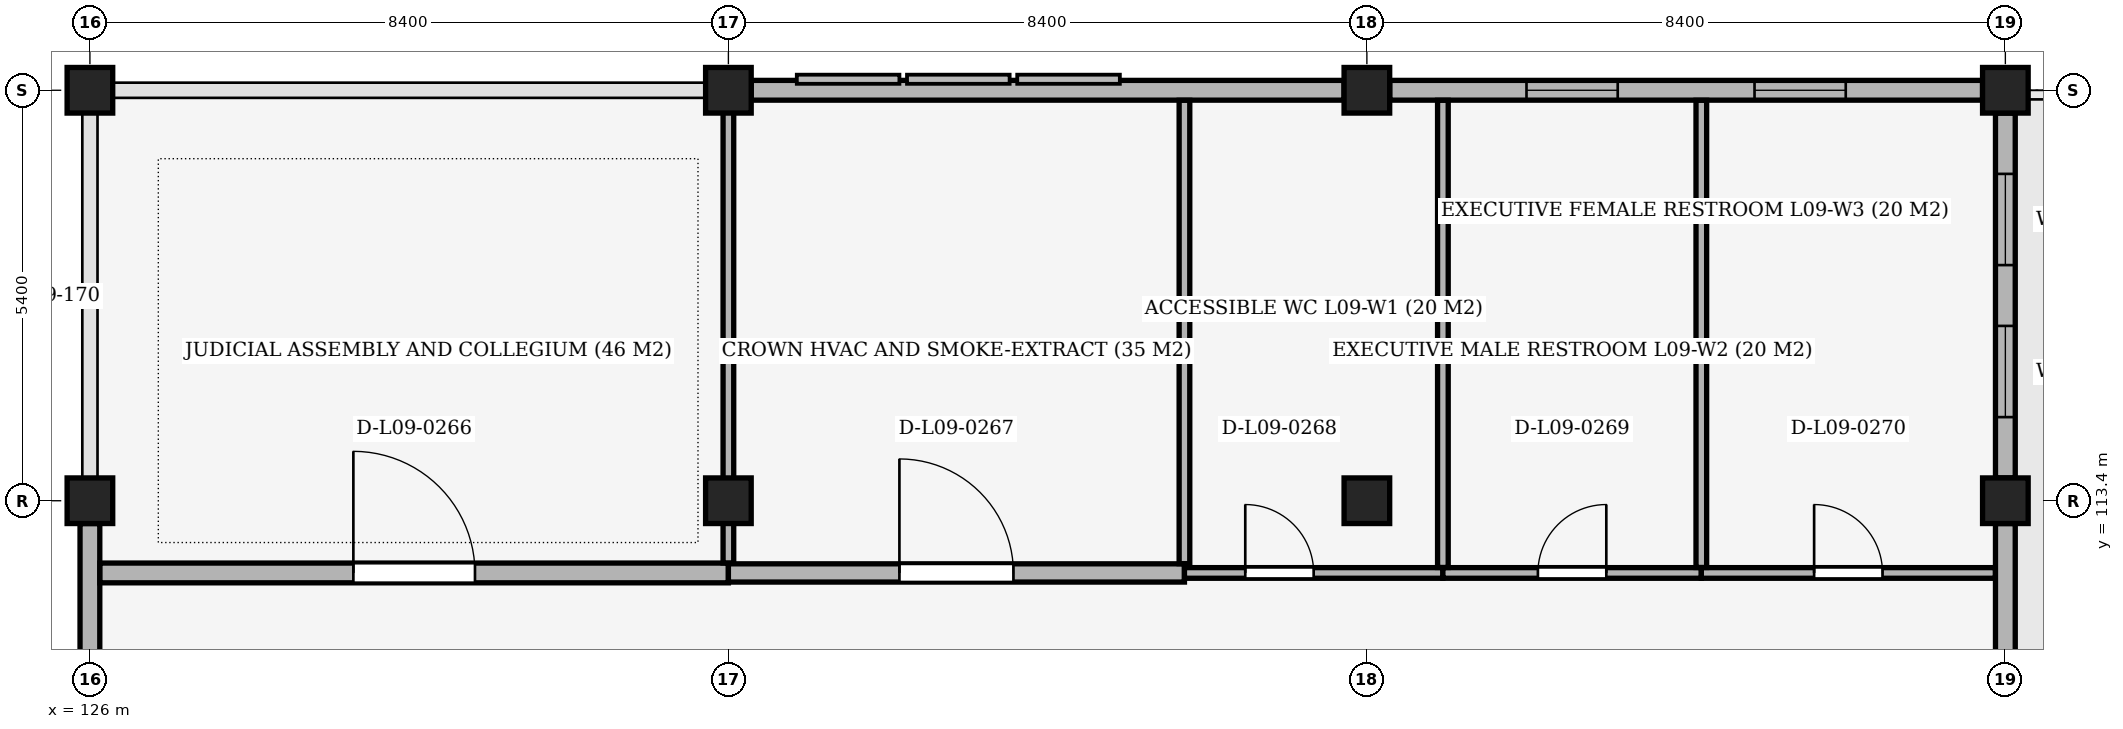
"""IFC4 building model, lengths in metres.
Left out: names, types, materials, properties, quantities, classifications, styles, units other than length and angle.
Written with IfcOpenShell. Run it as: python <this file> out.ifc"""

import sys

from ifc_helpers import new_model, si_unit, direction, frame, frame_2d, origin, origin_2d, place, context, subcontext, project, spatial, rectangle, extrude, element, fill, save


model = new_model("IFC4")
c1 = context("Model", 3, precision=1e-05, world=origin(), true_north=direction((0.0, 1.0)))
c2 = subcontext(c1, "Body", "Model", "MODEL_VIEW")
j1 = project(units=[si_unit("LENGTHUNIT", "METRE"), si_unit("PLANEANGLEUNIT", "RADIAN")], contexts=[c1])
p1 = place(None, origin())
s1 = spatial("IfcSite", under=j1, at=p1, CompositionType="ELEMENT")
p2 = place(p1, origin())
s2 = spatial("IfcBuilding", under=s1, at=p2, CompositionType="ELEMENT")
p3 = place(p2, frame((0.0, 0.0, 42.0)))
s3 = spatial("IfcBuildingStorey", under=s2, at=p3, CompositionType="ELEMENT", Elevation=42.0)
for number, where, z_axis, x_axis in (
    (1, (126.0, 113.4, 0.0), (0.0, 0.0, 1.0), (1.0, 0.0, 0.0)),
    (2, (126.0, 118.8, 0.0), (0.0, 0.0, 1.0), (1.0, 0.0, 0.0)),
    (3, (134.4, 113.4, 0.0), (0.0, 0.0, 1.0), (1.0, 0.0, 0.0)),
    (4, (134.4, 118.8, 0.0), (0.0, 0.0, 1.0), (1.0, 0.0, 0.0)),
    (5, (142.8, 113.4, 0.0), (0.0, 0.0, 1.0), (1.0, 0.0, 0.0)),
    (6, (142.8, 118.8, 0.0), (0.0, 0.0, 1.0), (1.0, 0.0, 0.0)),
    (7, (151.2, 113.4, 0.0), (0.0, 0.0, 1.0), (1.0, 0.0, 0.0)),
    (8, (151.2, 118.8, 0.0), (0.0, 0.0, 1.0), (1.0, 0.0, 0.0)),
):
    element("IfcColumn", number, at=place(p3, frame(where, z_axis=z_axis, x_axis=x_axis)), inside=s3, PredefinedType="COLUMN", context=c2, shape_type="SweptSolid", body=[
        extrude(rectangle(XDim=0.6, YDim=0.6, at=origin_2d()), origin(), (0.0, 0.0, 1.0), 3.9),
    ])
p4 = place(p3, frame((126.0, 108.3, 0.0), z_axis=(0.0, 0.0, 1.0), x_axis=(0.0, 1.0, 0.0)))
e9 = element("IfcWall", 9, at=p4, inside=s3, PredefinedType="SOLIDWALL", context=c2, shape_type="SweptSolid", body=[
    extrude(rectangle(XDim=4.8, YDim=0.26, at=frame_2d((2.4, 0.0))), origin(), (0.0, 0.0, 1.0), 3.11),
])
p5 = place(p4, frame((0.8, 0.0, 1.86)))
e10 = element("IfcOpeningElement", 10, at=p5, cuts=e9, PredefinedType="OPENING", context=c2, shape_type="SweptSolid", body=[
    extrude(rectangle(XDim=1.2, YDim=0.9, at=frame_2d((0.6, 0.45))), frame((0.0, 0.145, 0.0), z_axis=(0.0, -1.0, 0.0), x_axis=(1.0, 0.0, 0.0)), (0.0, 0.0, 1.0), 0.29),
])
p6 = place(p3, frame((134.7, 118.8, 0.0), z_axis=(0.0, 0.0, 1.0), x_axis=(1.0, 0.0, 0.0)))
e11 = element("IfcWall", 11, at=p6, inside=s3, PredefinedType="SOLIDWALL", context=c2, shape_type="SweptSolid", body=[
    extrude(rectangle(XDim=7.8, YDim=0.26, at=frame_2d((3.9, 0.0))), origin(), (0.0, 0.0, 1.0), 2.96),
])
p7 = place(p3, frame((143.1, 118.8, 0.0), z_axis=(0.0, 0.0, 1.0), x_axis=(1.0, 0.0, 0.0)))
e12 = element("IfcWall", 12, at=p7, inside=s3, PredefinedType="SOLIDWALL", context=c2, shape_type="SweptSolid", body=[
    extrude(rectangle(XDim=7.8, YDim=0.26, at=frame_2d((3.9, 0.0))), origin(), (0.0, 0.0, 1.0), 2.96),
])
p8 = place(p7, frame((1.8, 0.0, 1.71)))
e13 = element("IfcOpeningElement", 13, at=p8, cuts=e12, PredefinedType="OPENING", context=c2, shape_type="SweptSolid", body=[
    extrude(rectangle(XDim=1.2, YDim=0.9, at=frame_2d((0.6, 0.45))), frame((0.0, 0.145, 0.0), z_axis=(0.0, -1.0, 0.0), x_axis=(1.0, 0.0, 0.0)), (0.0, 0.0, 1.0), 0.29),
])
p9 = place(p7, frame((4.8, 0.0, 1.71)))
e14 = element("IfcOpeningElement", 14, at=p9, cuts=e12, PredefinedType="OPENING", context=c2, shape_type="SweptSolid", body=[
    extrude(rectangle(XDim=1.2, YDim=0.9, at=frame_2d((0.6, 0.45))), frame((0.0, 0.145, 0.0), z_axis=(0.0, -1.0, 0.0), x_axis=(1.0, 0.0, 0.0)), (0.0, 0.0, 1.0), 0.29),
])
p10 = place(p3, frame((151.2, 118.5, 0.0), z_axis=(0.0, 0.0, 1.0), x_axis=(0.0, -1.0, 0.0)))
e15 = element("IfcWall", 15, at=p10, inside=s3, PredefinedType="SOLIDWALL", context=c2, shape_type="SweptSolid", body=[
    extrude(rectangle(XDim=4.8, YDim=0.26, at=frame_2d((2.4, 0.0))), origin(), (0.0, 0.0, 1.0), 3.11),
])
p11 = place(p10, frame((0.8, 0.0, 1.86)))
e16 = element("IfcOpeningElement", 16, at=p11, cuts=e15, PredefinedType="OPENING", context=c2, shape_type="SweptSolid", body=[
    extrude(rectangle(XDim=1.2, YDim=0.9, at=frame_2d((0.6, 0.45))), frame((0.0, 0.145, 0.0), z_axis=(0.0, -1.0, 0.0), x_axis=(1.0, 0.0, 0.0)), (0.0, 0.0, 1.0), 0.29),
])
p12 = place(p10, frame((2.8, 0.0, 1.86)))
e17 = element("IfcOpeningElement", 17, at=p12, cuts=e15, PredefinedType="OPENING", context=c2, shape_type="SweptSolid", body=[
    extrude(rectangle(XDim=1.2, YDim=0.9, at=frame_2d((0.6, 0.45))), frame((0.0, 0.145, 0.0), z_axis=(0.0, -1.0, 0.0), x_axis=(1.0, 0.0, 0.0)), (0.0, 0.0, 1.0), 0.29),
])
p13 = place(p3, frame((151.2, 113.1, 0.0), z_axis=(0.0, 0.0, 1.0), x_axis=(0.0, -1.0, 0.0)))
e18 = element("IfcWall", 18, at=p13, inside=s3, PredefinedType="SOLIDWALL", context=c2, shape_type="SweptSolid", body=[
    extrude(rectangle(XDim=4.8, YDim=0.26, at=frame_2d((2.4, 0.0))), origin(), (0.0, 0.0, 1.0), 3.11),
])
p14 = place(p13, frame((2.8, 0.0, 1.86)))
e19 = element("IfcOpeningElement", 19, at=p14, cuts=e18, PredefinedType="OPENING", context=c2, shape_type="SweptSolid", body=[
    extrude(rectangle(XDim=1.2, YDim=0.9, at=frame_2d((0.6, 0.45))), frame((0.0, 0.145, 0.0), z_axis=(0.0, -1.0, 0.0), x_axis=(1.0, 0.0, 0.0)), (0.0, 0.0, 1.0), 0.29),
])
p15 = place(p3, frame((126.132, 112.45, 0.0), z_axis=(0.0, 0.0, 1.0), x_axis=(1.0, 0.0, 0.0)))
e20 = element("IfcWall", 20, at=p15, inside=s3, PredefinedType="PARTITIONING", context=c2, shape_type="SweptSolid", body=[
    extrude(rectangle(XDim=8.268, YDim=0.26, at=frame_2d((4.134, 0.0))), origin(), (0.0, 0.0, 1.0), 3.11),
])
p16 = place(p15, frame((3.334, 0.0, 0.0)))
e21 = element("IfcOpeningElement", 21, at=p16, cuts=e20, PredefinedType="OPENING", context=c2, shape_type="SweptSolid", body=[
    extrude(rectangle(XDim=1.6, YDim=2.3, at=frame_2d((0.8, 1.15))), frame((0.0, 0.145, 0.0), z_axis=(0.0, -1.0, 0.0), x_axis=(1.0, 0.0, 0.0)), (0.0, 0.0, 1.0), 0.29),
])
p17 = place(p3, frame((134.4, 112.45, 0.0), z_axis=(0.0, 0.0, 1.0), x_axis=(1.0, 0.0, 0.0)))
e22 = element("IfcWall", 22, at=p17, inside=s3, PredefinedType="PARTITIONING", context=c2, shape_type="SweptSolid", body=[
    extrude(rectangle(XDim=6.0, YDim=0.24, at=frame_2d((3.0, 0.0))), origin(), (0.0, 0.0, 1.0), 3.11),
])
p18 = place(p17, frame((2.25, 0.0, 0.0)))
e23 = element("IfcOpeningElement", 23, at=p18, cuts=e22, PredefinedType="OPENING", context=c2, shape_type="SweptSolid", body=[
    extrude(rectangle(XDim=1.5, YDim=2.2, at=frame_2d((0.75, 1.1))), frame((0.0, 0.135, 0.0), z_axis=(0.0, -1.0, 0.0), x_axis=(1.0, 0.0, 0.0)), (0.0, 0.0, 1.0), 0.27),
])
p19 = place(p3, frame((140.4, 112.45, 0.0), z_axis=(0.0, 0.0, 1.0), x_axis=(1.0, 0.0, 0.0)))
e24 = element("IfcWall", 24, at=p19, inside=s3, PredefinedType="PARTITIONING", context=c2, shape_type="SweptSolid", body=[
    extrude(rectangle(XDim=3.4, YDim=0.14, at=frame_2d((1.7, 0.0))), origin(), (0.0, 0.0, 1.0), 3.11),
])
p20 = place(p19, frame((0.8, 0.0, 0.0)))
e25 = element("IfcOpeningElement", 25, at=p20, cuts=e24, PredefinedType="OPENING", context=c2, shape_type="SweptSolid", body=[
    extrude(rectangle(XDim=0.9, YDim=2.1, at=frame_2d((0.45, 1.05))), frame((0.0, 0.085, 0.0), z_axis=(0.0, -1.0, 0.0), x_axis=(1.0, 0.0, 0.0)), (0.0, 0.0, 1.0), 0.17),
])
p21 = place(p3, frame((143.8, 112.45, 0.0), z_axis=(0.0, 0.0, 1.0), x_axis=(1.0, 0.0, 0.0)))
e26 = element("IfcWall", 26, at=p21, inside=s3, PredefinedType="PARTITIONING", context=c2, shape_type="SweptSolid", body=[
    extrude(rectangle(XDim=3.4, YDim=0.14, at=frame_2d((1.7, 0.0))), origin(), (0.0, 0.0, 1.0), 3.66),
])
p22 = place(p21, frame((1.25, 0.0, 0.0)))
e27 = element("IfcOpeningElement", 27, at=p22, cuts=e26, PredefinedType="OPENING", context=c2, shape_type="SweptSolid", body=[
    extrude(rectangle(XDim=0.9, YDim=2.1, at=frame_2d((0.45, 1.05))), frame((0.0, 0.085, 0.0), z_axis=(0.0, -1.0, 0.0), x_axis=(1.0, 0.0, 0.0)), (0.0, 0.0, 1.0), 0.17),
])
p23 = place(p3, frame((147.2, 112.45, 0.0), z_axis=(0.0, 0.0, 1.0), x_axis=(1.0, 0.0, 0.0)))
e28 = element("IfcWall", 28, at=p23, inside=s3, PredefinedType="PARTITIONING", context=c2, shape_type="SweptSolid", body=[
    extrude(rectangle(XDim=3.868, YDim=0.14, at=frame_2d((1.934, 0.0))), origin(), (0.0, 0.0, 1.0), 3.11),
])
p24 = place(p23, frame((1.484, 0.0, 0.0)))
e29 = element("IfcOpeningElement", 29, at=p24, cuts=e28, PredefinedType="OPENING", context=c2, shape_type="SweptSolid", body=[
    extrude(rectangle(XDim=0.9, YDim=2.1, at=frame_2d((0.45, 1.05))), frame((0.0, 0.085, 0.0), z_axis=(0.0, -1.0, 0.0), x_axis=(1.0, 0.0, 0.0)), (0.0, 0.0, 1.0), 0.17),
])
p25 = place(p3, frame((134.4, 112.582, 0.0), z_axis=(0.0, 0.0, 1.0), x_axis=(0.0, 1.0, 0.0)))
e30 = element("IfcWall", 30, at=p25, inside=s3, PredefinedType="PARTITIONING", context=c2, shape_type="SweptSolid", body=[
    extrude(rectangle(XDim=6.206, YDim=0.14, at=frame_2d((3.103, 0.0))), origin(), (0.0, 0.0, 1.0), 2.96),
])
p26 = place(p3, frame((140.4, 112.572, 0.0), z_axis=(0.0, 0.0, 1.0), x_axis=(0.0, 1.0, 0.0)))
e31 = element("IfcWall", 31, at=p26, inside=s3, PredefinedType="PARTITIONING", context=c2, shape_type="SweptSolid", body=[
    extrude(rectangle(XDim=6.096, YDim=0.14, at=frame_2d((3.048, 0.0))), origin(), (0.0, 0.0, 1.0), 2.96),
])
for number, where, z_axis, x_axis in (
    (32, (143.8, 112.522, 0.0), (0.0, 0.0, 1.0), (0.0, 1.0, 0.0)),
    (33, (147.2, 112.522, 0.0), (0.0, 0.0, 1.0), (0.0, 1.0, 0.0)),
):
    element("IfcWall", number, at=place(p3, frame(where, z_axis=z_axis, x_axis=x_axis)), inside=s3, PredefinedType="PARTITIONING", context=c2, shape_type="SweptSolid", body=[
        extrude(rectangle(XDim=6.146, YDim=0.14, at=frame_2d((3.073, 0.0))), origin(), (0.0, 0.0, 1.0), 2.96),
    ])
p27 = place(p8, origin())
e34 = element("IfcWindow", 34, at=p27, inside=s3, PartitioningType="SINGLE_PANEL", PredefinedType="WINDOW", context=c2, shape_type="SweptSolid", body=[
    extrude(rectangle(XDim=1.2, YDim=0.9, at=frame_2d((0.6, 0.45))), frame((0.0, 0.03, 0.0), z_axis=(0.0, -1.0, 0.0), x_axis=(1.0, 0.0, 0.0)), (0.0, 0.0, 1.0), 0.06),
])
fill(e13, e34)
p28 = place(p9, origin())
e35 = element("IfcWindow", 35, at=p28, inside=s3, PartitioningType="SINGLE_PANEL", PredefinedType="WINDOW", context=c2, shape_type="SweptSolid", body=[
    extrude(rectangle(XDim=1.2, YDim=0.9, at=frame_2d((0.6, 0.45))), frame((0.0, 0.03, 0.0), z_axis=(0.0, -1.0, 0.0), x_axis=(1.0, 0.0, 0.0)), (0.0, 0.0, 1.0), 0.06),
])
fill(e14, e35)
p29 = place(p11, origin())
e36 = element("IfcWindow", 36, at=p29, inside=s3, PartitioningType="SINGLE_PANEL", PredefinedType="WINDOW", context=c2, shape_type="SweptSolid", body=[
    extrude(rectangle(XDim=1.2, YDim=0.9, at=frame_2d((0.6, 0.45))), frame((0.0, 0.03, 0.0), z_axis=(0.0, -1.0, 0.0), x_axis=(1.0, 0.0, 0.0)), (0.0, 0.0, 1.0), 0.06),
])
fill(e16, e36)
p30 = place(p12, origin())
e37 = element("IfcWindow", 37, at=p30, inside=s3, PartitioningType="SINGLE_PANEL", PredefinedType="WINDOW", context=c2, shape_type="SweptSolid", body=[
    extrude(rectangle(XDim=1.2, YDim=0.9, at=frame_2d((0.6, 0.45))), frame((0.0, 0.03, 0.0), z_axis=(0.0, -1.0, 0.0), x_axis=(1.0, 0.0, 0.0)), (0.0, 0.0, 1.0), 0.06),
])
fill(e17, e37)
p31 = place(p16, origin())
e38 = element("IfcDoor", 38, at=p31, inside=s3, OperationType="SINGLE_SWING_LEFT", PredefinedType="DOOR", context=c2, shape_type="SweptSolid", body=[
    extrude(rectangle(XDim=1.6, YDim=2.3, at=frame_2d((0.8, 1.15))), frame((0.0, 0.025, 0.0), z_axis=(0.0, -1.0, 0.0), x_axis=(1.0, 0.0, 0.0)), (0.0, 0.0, 1.0), 0.05),
])
fill(e21, e38)
p32 = place(p18, origin())
e39 = element("IfcDoor", 39, at=p32, inside=s3, OperationType="SINGLE_SWING_LEFT", PredefinedType="DOOR", context=c2, shape_type="SweptSolid", body=[
    extrude(rectangle(XDim=1.5, YDim=2.2, at=frame_2d((0.75, 1.1))), frame((0.0, 0.025, 0.0), z_axis=(0.0, -1.0, 0.0), x_axis=(1.0, 0.0, 0.0)), (0.0, 0.0, 1.0), 0.05),
])
fill(e23, e39)
p33 = place(p20, origin())
e40 = element("IfcDoor", 40, at=p33, inside=s3, OperationType="SINGLE_SWING_LEFT", PredefinedType="DOOR", context=c2, shape_type="SweptSolid", body=[
    extrude(rectangle(XDim=0.9, YDim=2.1, at=frame_2d((0.45, 1.05))), frame((0.0, 0.025, 0.0), z_axis=(0.0, -1.0, 0.0), x_axis=(1.0, 0.0, 0.0)), (0.0, 0.0, 1.0), 0.05),
])
fill(e25, e40)
p34 = place(p22, origin())
e41 = element("IfcDoor", 41, at=p34, inside=s3, OperationType="SINGLE_SWING_RIGHT", PredefinedType="DOOR", context=c2, shape_type="SweptSolid", body=[
    extrude(rectangle(XDim=0.9, YDim=2.1, at=frame_2d((0.45, 1.05))), frame((0.0, 0.025, 0.0), z_axis=(0.0, -1.0, 0.0), x_axis=(1.0, 0.0, 0.0)), (0.0, 0.0, 1.0), 0.05),
])
fill(e27, e41)
p35 = place(p24, origin())
e42 = element("IfcDoor", 42, at=p35, inside=s3, OperationType="SINGLE_SWING_LEFT", PredefinedType="DOOR", context=c2, shape_type="SweptSolid", body=[
    extrude(rectangle(XDim=0.9, YDim=2.1, at=frame_2d((0.45, 1.05))), frame((0.0, 0.025, 0.0), z_axis=(0.0, -1.0, 0.0), x_axis=(1.0, 0.0, 0.0)), (0.0, 0.0, 1.0), 0.05),
])
fill(e29, e42)
save(model, sys.argv[1])
